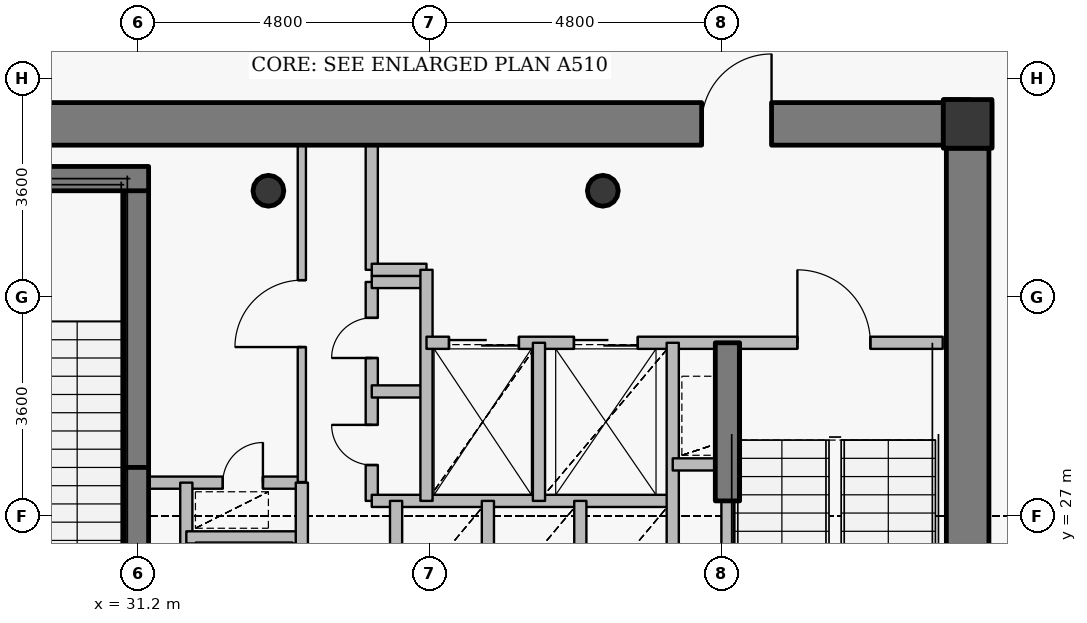
"""IFC4 building model, lengths in metres.
Left out: names, types, materials, properties, quantities, classifications, styles, units other than length and angle.
Written with IfcOpenShell. Run it as: python <this file> out.ifc"""

import sys

from ifc_helpers import new_model, si_unit, direction, frame, frame_2d, origin, origin_2d, place, context, subcontext, project, spatial, rectangle, hollow_circle, extrude, source, transform, mapped, element, fill, save


model = new_model("IFC4")
c1 = context("Model", 3, precision=1e-05, world=origin(), true_north=direction((0.0, 1.0)))
c2 = subcontext(c1, "Body", "Model", "MODEL_VIEW")
j1 = project(units=[si_unit("LENGTHUNIT", "METRE"), si_unit("PLANEANGLEUNIT", "RADIAN")], contexts=[c1])
p1 = place(None, origin())
s1 = spatial("IfcSite", under=j1, at=p1, CompositionType="ELEMENT")
p2 = place(p1, origin())
s2 = spatial("IfcBuilding", under=s1, at=p2, CompositionType="ELEMENT")
p3 = place(p2, frame((0.0, 0.0, 363.6)))
s3 = spatial("IfcBuildingStorey", under=s2, at=p3, CompositionType="ELEMENT", Elevation=363.6)
p4 = place(p3, frame((44.85, 33.45, 0.0), z_axis=(0.0, 0.0, 1.0), x_axis=(1.0, 0.0, 0.0)))
e1 = element("IfcColumn", 1, at=p4, inside=s3, PredefinedType="COLUMN", context=c2, shape_type="SweptSolid", body=[
    extrude(rectangle(XDim=0.8, YDim=0.8, at=origin_2d()), origin(), (0.0, 0.0, 1.0), 4.8),
])
for number, where, z_axis, x_axis in (
    (2, (38.85, 32.35, 0.0), (0.0, 0.0, 1.0), (1.0, 0.0, 0.0)),
    (3, (33.35, 32.35, 0.0), (0.0, 0.0, 1.0), (1.0, 0.0, 0.0)),
):
    element("IfcColumn", number, at=place(p3, frame(where, z_axis=z_axis, x_axis=x_axis)), inside=s3, PredefinedType="COLUMN", context=c2, shape_type="SweptSolid", body=[
        extrude(hollow_circle(Radius=0.254, WallThickness=0.02, at=origin_2d()), origin(), (0.0, 0.0, 1.0), 4.8),
    ])
p5 = place(p3, frame((31.18, 27.8, 0.0), z_axis=(0.0, 0.0, 1.0), x_axis=(0.0, 1.0, 0.0)))
e4 = element("IfcWall", 4, at=p5, inside=s3, PredefinedType="SHEAR", context=c2, shape_type="SweptSolid", body=[
    extrude(rectangle(XDim=4.75, YDim=0.4, at=frame_2d((2.375, 0.0))), origin(), (0.0, 0.0, 1.0), 4.8),
])
p6 = place(p3, frame((27.25, 32.55, 0.0), z_axis=(0.0, 0.0, 1.0), x_axis=(1.0, 0.0, 0.0)))
e5 = element("IfcWall", 5, at=p6, inside=s3, PredefinedType="SHEAR", context=c2, shape_type="SweptSolid", body=[
    extrude(rectangle(XDim=4.13, YDim=0.4, at=frame_2d((2.065, 0.0))), origin(), (0.0, 0.0, 1.0), 4.8),
])
p7 = place(p3, frame((27.55, 33.45, 0.0), z_axis=(0.0, 0.0, 1.0), x_axis=(1.0, 0.0, 0.0)))
e6 = element("IfcWall", 6, at=p7, inside=s3, PredefinedType="SHEAR", context=c2, shape_type="SweptSolid", body=[
    extrude(rectangle(XDim=16.9, YDim=0.7, at=frame_2d((8.45, 0.0))), origin(), (0.0, 0.0, 1.0), 4.05),
])
p8 = place(p7, frame((12.925, 0.0, 0.0)))
e7 = element("IfcOpeningElement", 7, at=p8, cuts=e6, PredefinedType="OPENING", context=c2, shape_type="SweptSolid", body=[
    extrude(rectangle(XDim=1.15, YDim=2.15, at=origin_2d()), frame((0.575, 0.36, 1.075), z_axis=(0.0, -1.0, 0.0), x_axis=(1.0, 0.0, 0.0)), (0.0, 0.0, 1.0), 0.72),
])
p9 = place(p3, frame((44.85, 33.05, 0.0), z_axis=(0.0, 0.0, 1.0), x_axis=(0.0, -1.0, 0.0)))
e8 = element("IfcWall", 8, at=p9, inside=s3, PredefinedType="SHEAR", context=c2, shape_type="SweptSolid", body=[
    extrude(rectangle(XDim=12.1, YDim=0.7, at=frame_2d((6.05, 0.0))), origin(), (0.0, 0.0, 1.0), 4.05),
])
p10 = place(p3, frame((31.18, 25.55, 0.0), z_axis=(0.0, 0.0, 1.0), x_axis=(0.0, 1.0, 0.0)))
e9 = element("IfcWall", 9, at=p10, inside=s3, PredefinedType="SHEAR", context=c2, shape_type="SweptSolid", body=[
    extrude(rectangle(XDim=2.25, YDim=0.4, at=frame_2d((1.125, 0.0))), origin(), (0.0, 0.0, 1.0), 4.1),
])
p11 = place(p3, frame((40.9, 27.25, 0.0), z_axis=(0.0, 0.0, 1.0), x_axis=(0.0, 1.0, 0.0)))
e10 = element("IfcWall", 10, at=p11, inside=s3, PredefinedType="SHEAR", context=c2, shape_type="SweptSolid", body=[
    extrude(rectangle(XDim=2.6, YDim=0.4, at=frame_2d((1.3, 0.0))), origin(), (0.0, 0.0, 1.0), 4.1),
])
p12 = place(p3, frame((31.1, 27.55, 0.0), z_axis=(0.0, 0.0, 1.0), x_axis=(1.0, 0.0, 0.0)))
e11 = element("IfcWall", 11, at=p12, inside=s3, PredefinedType="PARTITIONING", context=c2, shape_type="SweptSolid", body=[
    extrude(rectangle(XDim=2.8, YDim=0.2, at=frame_2d((1.4, 0.0))), origin(), (0.0, 0.0, 1.0), 4.085),
])
p13 = place(p12, frame((1.5, 0.0, 0.0)))
e12 = element("IfcOpeningElement", 12, at=p13, cuts=e11, PredefinedType="OPENING", context=c2, shape_type="SweptSolid", body=[
    extrude(rectangle(XDim=0.66, YDim=2.05, at=origin_2d()), frame((0.33, 0.11, 1.025), z_axis=(0.0, -1.0, 0.0), x_axis=(1.0, 0.0, 0.0)), (0.0, 0.0, 1.0), 0.22),
])
p14 = place(p3, frame((32.0, 24.1, 0.0), z_axis=(0.0, 0.0, 1.0), x_axis=(0.0, 1.0, 0.0)))
e13 = element("IfcWall", 13, at=p14, inside=s3, PredefinedType="PARTITIONING", context=c2, shape_type="SweptSolid", body=[
    extrude(rectangle(XDim=3.45, YDim=0.2, at=frame_2d((1.725, 0.0))), origin(), (0.0, 0.0, 1.0), 4.5),
])
p15 = place(p3, frame((32.0, 26.65, 0.0), z_axis=(0.0, 0.0, 1.0), x_axis=(1.0, 0.0, 0.0)))
e14 = element("IfcWall", 14, at=p15, inside=s3, PredefinedType="PARTITIONING", context=c2, shape_type="SweptSolid", body=[
    extrude(rectangle(XDim=1.9, YDim=0.2, at=frame_2d((0.95, 0.0))), origin(), (0.0, 0.0, 1.0), 4.085),
])
p16 = place(p3, frame((33.9, 20.9, 0.0), z_axis=(0.0, 0.0, 1.0), x_axis=(0.0, 1.0, 0.0)))
e15 = element("IfcWall", 15, at=p16, inside=s3, PredefinedType="PARTITIONING", context=c2, shape_type="SweptSolid", body=[
    extrude(rectangle(XDim=6.65, YDim=0.2, at=frame_2d((3.325, 0.0))), origin(), (0.0, 0.0, 1.0), 4.085),
])
p17 = place(p3, frame((33.9, 27.56, 0.0), z_axis=(0.0, 0.0, 1.0), x_axis=(0.0, 1.0, 0.0)))
e16 = element("IfcWall", 16, at=p17, inside=s3, PredefinedType="PARTITIONING", context=c2, shape_type="SweptSolid", body=[
    extrude(rectangle(XDim=5.54, YDim=0.135, at=frame_2d((2.77, 0.0))), origin(), (0.0, 0.0, 1.0), 4.085),
])
p18 = place(p17, frame((2.22, 0.0, 0.0)))
e17 = element("IfcOpeningElement", 17, at=p18, cuts=e16, PredefinedType="OPENING", context=c2, shape_type="SweptSolid", body=[
    extrude(rectangle(XDim=1.1, YDim=2.15, at=origin_2d()), frame((0.55, 0.078, 1.075), z_axis=(0.0, -1.0, 0.0), x_axis=(1.0, 0.0, 0.0)), (0.0, 0.0, 1.0), 0.155),
])
p19 = place(p3, frame((35.05, 27.25, 0.0), z_axis=(0.0, 0.0, 1.0), x_axis=(0.0, 1.0, 0.0)))
e18 = element("IfcWall", 18, at=p19, inside=s3, PredefinedType="PARTITIONING", context=c2, shape_type="SweptSolid", body=[
    extrude(rectangle(XDim=3.6, YDim=0.2, at=frame_2d((1.8, 0.0))), origin(), (0.0, 0.0, 1.0), 4.5),
])
p20 = place(p19, frame((0.59, 0.0, 0.0)))
e19 = element("IfcOpeningElement", 19, at=p20, cuts=e18, PredefinedType="OPENING", context=c2, shape_type="SweptSolid", body=[
    extrude(rectangle(XDim=0.66, YDim=2.05, at=origin_2d()), frame((0.33, 0.11, 1.025), z_axis=(0.0, -1.0, 0.0), x_axis=(1.0, 0.0, 0.0)), (0.0, 0.0, 1.0), 0.22),
])
p21 = place(p19, frame((2.35, 0.0, 0.0)))
e20 = element("IfcOpeningElement", 20, at=p21, cuts=e18, PredefinedType="OPENING", context=c2, shape_type="SweptSolid", body=[
    extrude(rectangle(XDim=0.66, YDim=2.05, at=origin_2d()), frame((0.33, 0.11, 1.025), z_axis=(0.0, -1.0, 0.0), x_axis=(1.0, 0.0, 0.0)), (0.0, 0.0, 1.0), 0.22),
])
p22 = place(p3, frame((35.05, 27.25, 0.0), z_axis=(0.0, 0.0, 1.0), x_axis=(1.0, 0.0, 0.0)))
e21 = element("IfcWall", 21, at=p22, inside=s3, PredefinedType="PARTITIONING", context=c2, shape_type="SweptSolid", body=[
    extrude(rectangle(XDim=4.95, YDim=0.2, at=frame_2d((2.475, 0.0))), origin(), (0.0, 0.0, 1.0), 4.085),
])
for number, where, z_axis, x_axis in (
    (22, (35.05, 29.05, 0.0), (0.0, 0.0, 1.0), (1.0, 0.0, 0.0)),
    (23, (35.05, 30.85, 0.0), (0.0, 0.0, 1.0), (1.0, 0.0, 0.0)),
):
    element("IfcWall", number, at=place(p3, frame(where, z_axis=z_axis, x_axis=x_axis)), inside=s3, PredefinedType="PARTITIONING", context=c2, shape_type="SweptSolid", body=[
        extrude(rectangle(XDim=0.9, YDim=0.2, at=frame_2d((0.45, 0.0))), origin(), (0.0, 0.0, 1.0), 4.5),
    ])
p23 = place(p3, frame((35.05, 31.05, 0.0), z_axis=(0.0, 0.0, 1.0), x_axis=(0.0, 1.0, 0.0)))
e24 = element("IfcWall", 24, at=p23, inside=s3, PredefinedType="PARTITIONING", context=c2, shape_type="SweptSolid", body=[
    extrude(rectangle(XDim=2.05, YDim=0.2, at=frame_2d((1.025, 0.0))), origin(), (0.0, 0.0, 1.0), 4.085),
])
p24 = place(p3, frame((35.05, 31.05, 0.0), z_axis=(0.0, 0.0, 1.0), x_axis=(1.0, 0.0, 0.0)))
e25 = element("IfcWall", 25, at=p24, inside=s3, PredefinedType="PARTITIONING", context=c2, shape_type="SweptSolid", body=[
    extrude(rectangle(XDim=0.9, YDim=0.2, at=frame_2d((0.45, 0.0))), origin(), (0.0, 0.0, 1.0), 4.5),
])
p25 = place(p3, frame((35.45, 25.45, 0.0), z_axis=(0.0, 0.0, 1.0), x_axis=(0.0, 1.0, 0.0)))
e26 = element("IfcWall", 26, at=p25, inside=s3, PredefinedType="PARTITIONING", context=c2, shape_type="SweptSolid", body=[
    extrude(rectangle(XDim=1.8, YDim=0.2, at=frame_2d((0.9, 0.0))), origin(), (0.0, 0.0, 1.0), 4.5),
])
p26 = place(p3, frame((35.95, 27.25, 0.0), z_axis=(0.0, 0.0, 1.0), x_axis=(0.0, 1.0, 0.0)))
e27 = element("IfcWall", 27, at=p26, inside=s3, PredefinedType="PARTITIONING", context=c2, shape_type="SweptSolid", body=[
    extrude(rectangle(XDim=3.8, YDim=0.2, at=frame_2d((1.9, 0.0))), origin(), (0.0, 0.0, 1.0), 4.5),
])
p27 = place(p3, frame((35.95, 29.85, 0.0), z_axis=(0.0, 0.0, 1.0), x_axis=(1.0, 0.0, 0.0)))
e28 = element("IfcWall", 28, at=p27, inside=s3, PredefinedType="PARTITIONING", context=c2, shape_type="SweptSolid", body=[
    extrude(rectangle(XDim=8.49, YDim=0.2, at=frame_2d((4.245, 0.0))), origin(), (0.0, 0.0, 1.0), 4.085),
])
p28 = place(p27, frame((6.1, 0.0, 0.0)))
e29 = element("IfcOpeningElement", 29, at=p28, cuts=e28, PredefinedType="OPENING", context=c2, shape_type="SweptSolid", body=[
    extrude(rectangle(XDim=1.2, YDim=2.15, at=origin_2d()), frame((0.6, 0.11, 1.075), z_axis=(0.0, -1.0, 0.0), x_axis=(1.0, 0.0, 0.0)), (0.0, 0.0, 1.0), 0.22),
])
p29 = place(p27, frame((0.37, 0.0, 0.0)))
e30 = element("IfcOpeningElement", 30, at=p29, cuts=e28, PredefinedType="OPENING", context=c2, shape_type="SweptSolid", body=[
    extrude(rectangle(XDim=1.15, YDim=2.15, at=origin_2d()), frame((0.575, 0.11, 1.075), z_axis=(0.0, -1.0, 0.0), x_axis=(1.0, 0.0, 0.0)), (0.0, 0.0, 1.0), 0.22),
])
p30 = place(p27, frame((2.425, 0.0, 0.0)))
e31 = element("IfcOpeningElement", 31, at=p30, cuts=e28, PredefinedType="OPENING", context=c2, shape_type="SweptSolid", body=[
    extrude(rectangle(XDim=1.05, YDim=2.15, at=origin_2d()), frame((0.525, 0.11, 1.075), z_axis=(0.0, -1.0, 0.0), x_axis=(1.0, 0.0, 0.0)), (0.0, 0.0, 1.0), 0.22),
])
p31 = place(p3, frame((36.96, 25.45, 0.0), z_axis=(0.0, 0.0, 1.0), x_axis=(0.0, 1.0, 0.0)))
e32 = element("IfcWall", 32, at=p31, inside=s3, PredefinedType="PARTITIONING", context=c2, shape_type="SweptSolid", body=[
    extrude(rectangle(XDim=1.8, YDim=0.2, at=frame_2d((0.9, 0.0))), origin(), (0.0, 0.0, 1.0), 4.5),
])
p32 = place(p3, frame((37.8, 27.25, 0.0), z_axis=(0.0, 0.0, 1.0), x_axis=(0.0, 1.0, 0.0)))
e33 = element("IfcWall", 33, at=p32, inside=s3, PredefinedType="PARTITIONING", context=c2, shape_type="SweptSolid", body=[
    extrude(rectangle(XDim=2.6, YDim=0.2, at=frame_2d((1.3, 0.0))), origin(), (0.0, 0.0, 1.0), 4.5),
])
p33 = place(p3, frame((38.48, 25.45, 0.0), z_axis=(0.0, 0.0, 1.0), x_axis=(0.0, 1.0, 0.0)))
e34 = element("IfcWall", 34, at=p33, inside=s3, PredefinedType="PARTITIONING", context=c2, shape_type="SweptSolid", body=[
    extrude(rectangle(XDim=1.8, YDim=0.2, at=frame_2d((0.9, 0.0))), origin(), (0.0, 0.0, 1.0), 4.5),
])
p34 = place(p3, frame((40.0, 25.45, 0.0), z_axis=(0.0, 0.0, 1.0), x_axis=(0.0, 1.0, 0.0)))
e35 = element("IfcWall", 35, at=p34, inside=s3, PredefinedType="PARTITIONING", context=c2, shape_type="SweptSolid", body=[
    extrude(rectangle(XDim=4.4, YDim=0.2, at=frame_2d((2.2, 0.0))), origin(), (0.0, 0.0, 1.0), 4.5),
])
p35 = place(p3, frame((40.0, 27.85, 0.0), z_axis=(0.0, 0.0, 1.0), x_axis=(1.0, 0.0, 0.0)))
e36 = element("IfcWall", 36, at=p35, inside=s3, PredefinedType="PARTITIONING", context=c2, shape_type="SweptSolid", body=[
    extrude(rectangle(XDim=0.9, YDim=0.2, at=frame_2d((0.45, 0.0))), origin(), (0.0, 0.0, 1.0), 4.5),
])
p36 = place(p3, frame((40.9, 21.33, 0.0), z_axis=(0.0, 0.0, 1.0), x_axis=(0.0, 1.0, 0.0)))
e37 = element("IfcWall", 37, at=p36, inside=s3, PredefinedType="PARTITIONING", context=c2, shape_type="SweptSolid", body=[
    extrude(rectangle(XDim=5.91, YDim=0.2, at=frame_2d((2.955, 0.0))), origin(), (0.0, 0.0, 1.0), 4.035),
])
p37 = place(p3, frame((45.2, 33.06, 0.0), z_axis=(0.0, 0.0, 1.0), x_axis=(0.0, 1.0, 0.0)))
e38 = element("IfcWall", 38, at=p37, inside=s3, PredefinedType="PARTITIONING", context=c2, shape_type="SweptSolid", body=[
    extrude(rectangle(XDim=0.74, YDim=0.135, at=frame_2d((0.37, 0.0))), origin(), (0.0, 0.0, 1.0), 3.285),
])
p38 = place(p3, frame((44.893, 33.8, 0.0), z_axis=(0.0, 0.0, 1.0), x_axis=(-1.0, 0.0, 0.0)))
e39 = element("IfcWall", 39, at=p38, inside=s3, PredefinedType="PARTITIONING", context=c2, shape_type="SweptSolid", body=[
    extrude(rectangle(XDim=0.433, YDim=0.135, at=frame_2d((0.216, 0.0))), origin(), (0.0, 0.0, 1.0), 3.285),
])
m1 = source(origin(), c2, "Body", "SweptSolid", [
    extrude(rectangle(XDim=1.15, YDim=2.15, at=origin_2d()), frame((0.575, 0.025, 1.075), z_axis=(0.0, -1.0, 0.0), x_axis=(1.0, 0.0, 0.0)), (0.0, 0.0, 1.0), 0.05),
])
p39 = place(p8, origin())
e40 = element("IfcDoor", 40, at=p39, inside=s3, OperationType="SINGLE_SWING_RIGHT", PredefinedType="DOOR", context=c2, shape_type="MappedRepresentation", body=[
    mapped(m1, transform((0.0, 0.0, 0.0), x_axis=(1.0, 0.0, 0.0), y_axis=(0.0, 1.0, 0.0), z_axis=(0.0, 0.0, 1.0), scale=1.0)),
])
fill(e7, e40)
m2 = source(origin(), c2, "Body", "SweptSolid", [
    extrude(rectangle(XDim=1.2, YDim=2.15, at=origin_2d()), frame((0.6, 0.025, 1.075), z_axis=(0.0, -1.0, 0.0), x_axis=(1.0, 0.0, 0.0)), (0.0, 0.0, 1.0), 0.05),
])
p40 = place(p28, origin())
e41 = element("IfcDoor", 41, at=p40, inside=s3, OperationType="SINGLE_SWING_LEFT", PredefinedType="DOOR", context=c2, shape_type="MappedRepresentation", body=[
    mapped(m2, transform((0.0, 0.0, 0.0), x_axis=(1.0, 0.0, 0.0), y_axis=(0.0, 1.0, 0.0), z_axis=(0.0, 0.0, 1.0), scale=1.0)),
])
fill(e29, e41)
m3 = source(origin(), c2, "Body", "SweptSolid", [
    extrude(rectangle(XDim=1.15, YDim=2.15, at=origin_2d()), frame((0.575, 0.025, 1.075), z_axis=(0.0, -1.0, 0.0), x_axis=(1.0, 0.0, 0.0)), (0.0, 0.0, 1.0), 0.05),
])
p41 = place(p29, origin())
e42 = element("IfcDoor", 42, at=p41, inside=s3, OperationType="DOUBLE_DOOR_SLIDING", PredefinedType="USERDEFINED", context=c2, shape_type="MappedRepresentation", body=[
    mapped(m3, transform((0.0, 0.0, 0.0), x_axis=(1.0, 0.0, 0.0), y_axis=(0.0, 1.0, 0.0), z_axis=(0.0, 0.0, 1.0), scale=1.0)),
])
fill(e30, e42)
m4 = source(origin(), c2, "Body", "SweptSolid", [
    extrude(rectangle(XDim=1.05, YDim=2.15, at=origin_2d()), frame((0.525, 0.025, 1.075), z_axis=(0.0, -1.0, 0.0), x_axis=(1.0, 0.0, 0.0)), (0.0, 0.0, 1.0), 0.05),
])
p42 = place(p30, origin())
e43 = element("IfcDoor", 43, at=p42, inside=s3, OperationType="DOUBLE_DOOR_SLIDING", PredefinedType="USERDEFINED", context=c2, shape_type="MappedRepresentation", body=[
    mapped(m4, transform((0.0, 0.0, 0.0), x_axis=(1.0, 0.0, 0.0), y_axis=(0.0, 1.0, 0.0), z_axis=(0.0, 0.0, 1.0), scale=1.0)),
])
fill(e31, e43)
m5 = source(origin(), c2, "Body", "SweptSolid", [
    extrude(rectangle(XDim=0.66, YDim=2.05, at=origin_2d()), frame((0.33, 0.025, 1.025), z_axis=(0.0, -1.0, 0.0), x_axis=(1.0, 0.0, 0.0)), (0.0, 0.0, 1.0), 0.05),
])
p43 = place(p20, origin())
e44 = element("IfcDoor", 44, at=p43, inside=s3, OperationType="SINGLE_SWING_RIGHT", PredefinedType="USERDEFINED", context=c2, shape_type="MappedRepresentation", body=[
    mapped(m5, transform((0.0, 0.0, 0.0), x_axis=(1.0, 0.0, 0.0), y_axis=(0.0, 1.0, 0.0), z_axis=(0.0, 0.0, 1.0), scale=1.0)),
])
fill(e19, e44)
p44 = place(p21, origin())
e45 = element("IfcDoor", 45, at=p44, inside=s3, OperationType="SINGLE_SWING_LEFT", PredefinedType="USERDEFINED", context=c2, shape_type="MappedRepresentation", body=[
    mapped(m5, transform((0.0, 0.0, 0.0), x_axis=(1.0, 0.0, 0.0), y_axis=(0.0, 1.0, 0.0), z_axis=(0.0, 0.0, 1.0), scale=1.0)),
])
fill(e20, e45)
m6 = source(origin(), c2, "Body", "SweptSolid", [
    extrude(rectangle(XDim=1.1, YDim=2.15, at=origin_2d()), frame((0.55, 0.025, 1.075), z_axis=(0.0, -1.0, 0.0), x_axis=(1.0, 0.0, 0.0)), (0.0, 0.0, 1.0), 0.05),
])
p45 = place(p18, origin())
e46 = element("IfcDoor", 46, at=p45, inside=s3, OperationType="SINGLE_SWING_LEFT", PredefinedType="DOOR", context=c2, shape_type="MappedRepresentation", body=[
    mapped(m6, transform((0.0, 0.0, 0.0), x_axis=(1.0, 0.0, 0.0), y_axis=(0.0, 1.0, 0.0), z_axis=(0.0, 0.0, 1.0), scale=1.0)),
])
fill(e17, e46)
p46 = place(p13, origin())
e47 = element("IfcDoor", 47, at=p46, inside=s3, OperationType="SINGLE_SWING_RIGHT", PredefinedType="USERDEFINED", context=c2, shape_type="MappedRepresentation", body=[
    mapped(m5, transform((0.0, 0.0, 0.0), x_axis=(1.0, 0.0, 0.0), y_axis=(0.0, 1.0, 0.0), z_axis=(0.0, 0.0, 1.0), scale=1.0)),
])
fill(e12, e47)
save(model, sys.argv[1])
